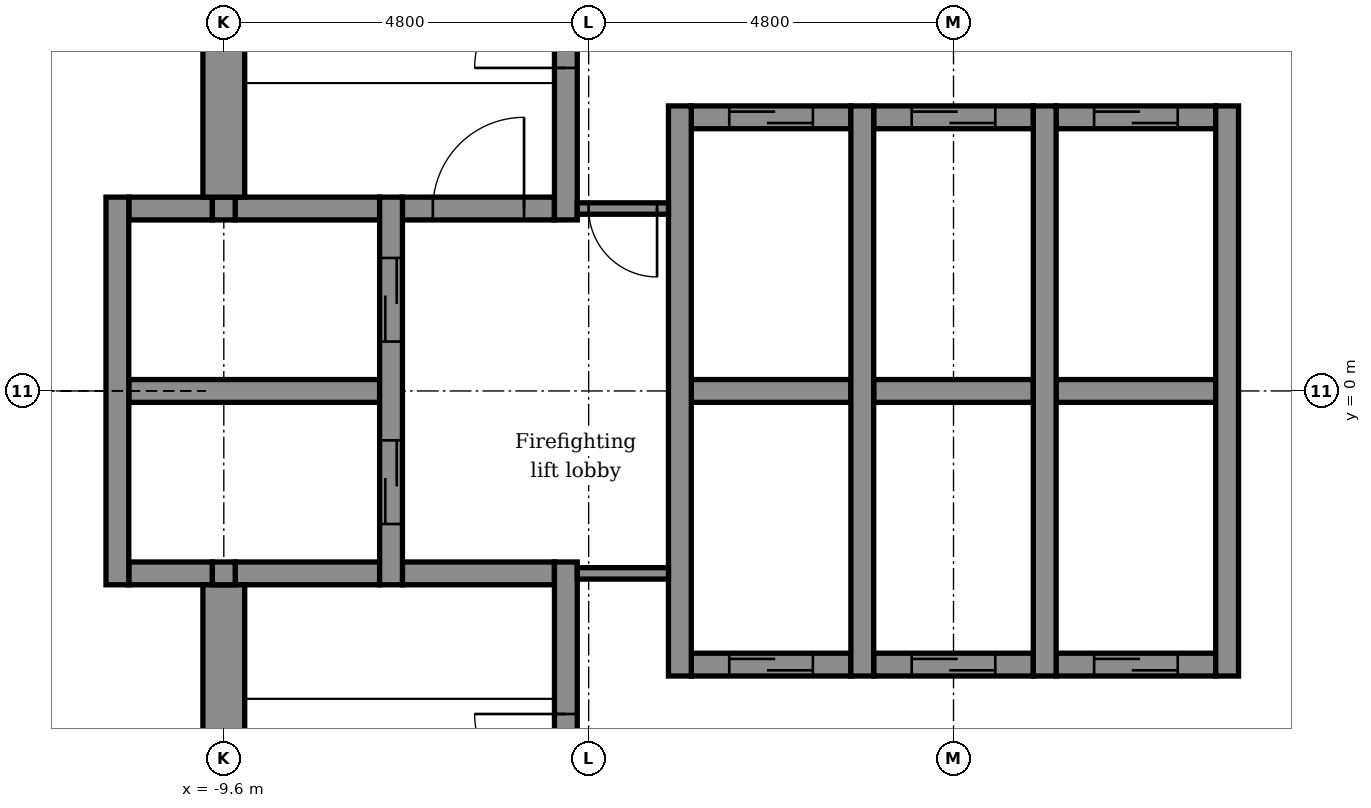
"""IFC4 building model, lengths in metres.
Left out: names, types, materials, properties, quantities, classifications, styles, units other than length and angle.
Written with IfcOpenShell. Run it as: python <this file> out.ifc"""

import sys

from ifc_helpers import new_model, si_unit, direction, frame, frame_2d, origin, place, context, subcontext, project, spatial, rectangle, extrude, element, fill, save


model = new_model("IFC4")
c1 = context("Model", 3, precision=1e-05, world=origin(), true_north=direction((0.0, 1.0)))
c2 = subcontext(c1, "Body", "Model", "MODEL_VIEW")
j1 = project(units=[si_unit("LENGTHUNIT", "METRE"), si_unit("PLANEANGLEUNIT", "RADIAN")], contexts=[c1])
p1 = place(None, origin())
s1 = spatial("IfcSite", under=j1, at=p1, CompositionType="ELEMENT")
p2 = place(p1, origin())
s2 = spatial("IfcBuilding", under=s1, at=p2, CompositionType="ELEMENT")
p3 = place(p2, frame((0.0, 0.0, 257.9)))
s3 = spatial("IfcBuildingStorey", under=s2, at=p3, CompositionType="ELEMENT", Elevation=257.9)
p4 = place(p3, frame((-3.45, -3.6, -0.15), z_axis=(0.0, 0.0, 1.0), x_axis=(1.0, 0.0, 0.0)))
e1 = element("IfcWall", 1, at=p4, inside=s3, PredefinedType="STANDARD", context=c2, shape_type="SweptSolid", body=[
    extrude(rectangle(XDim=2.1, YDim=0.3, at=frame_2d((1.05, 0.0))), origin(), (0.0, 0.0, 1.0), 3.9),
])
p5 = place(p4, frame((0.5, 0.0, 0.15)))
e2 = element("IfcOpeningElement", 2, at=p5, cuts=e1, PredefinedType="OPENING", context=c2, shape_type="SweptSolid", body=[
    extrude(rectangle(XDim=1.1, YDim=2.1, at=frame_2d((0.55, 1.05))), frame((0.0, 0.16, 0.0), z_axis=(0.0, -1.0, 0.0), x_axis=(1.0, 0.0, 0.0)), (0.0, 0.0, 1.0), 0.32),
])
p6 = place(p3, frame((-1.05, -3.6, -0.15), z_axis=(0.0, 0.0, 1.0), x_axis=(1.0, 0.0, 0.0)))
e3 = element("IfcWall", 3, at=p6, inside=s3, PredefinedType="STANDARD", context=c2, shape_type="SweptSolid", body=[
    extrude(rectangle(XDim=2.1, YDim=0.3, at=frame_2d((1.05, 0.0))), origin(), (0.0, 0.0, 1.0), 3.9),
])
p7 = place(p6, frame((0.5, 0.0, 0.15)))
e4 = element("IfcOpeningElement", 4, at=p7, cuts=e3, PredefinedType="OPENING", context=c2, shape_type="SweptSolid", body=[
    extrude(rectangle(XDim=1.1, YDim=2.1, at=frame_2d((0.55, 1.05))), frame((0.0, 0.16, 0.0), z_axis=(0.0, -1.0, 0.0), x_axis=(1.0, 0.0, 0.0)), (0.0, 0.0, 1.0), 0.32),
])
p8 = place(p3, frame((1.35, -3.6, -0.15), z_axis=(0.0, 0.0, 1.0), x_axis=(1.0, 0.0, 0.0)))
e5 = element("IfcWall", 5, at=p8, inside=s3, PredefinedType="STANDARD", context=c2, shape_type="SweptSolid", body=[
    extrude(rectangle(XDim=2.1, YDim=0.3, at=frame_2d((1.05, 0.0))), origin(), (0.0, 0.0, 1.0), 3.9),
])
p9 = place(p8, frame((0.5, 0.0, 0.15)))
e6 = element("IfcOpeningElement", 6, at=p9, cuts=e5, PredefinedType="OPENING", context=c2, shape_type="SweptSolid", body=[
    extrude(rectangle(XDim=1.1, YDim=2.1, at=frame_2d((0.55, 1.05))), frame((0.0, 0.16, 0.0), z_axis=(0.0, -1.0, 0.0), x_axis=(1.0, 0.0, 0.0)), (0.0, 0.0, 1.0), 0.32),
])
p10 = place(p3, frame((-10.85, -2.4, -0.15), z_axis=(0.0, 0.0, 1.0), x_axis=(1.0, 0.0, 0.0)))
e7 = element("IfcWall", 7, at=p10, inside=s3, PredefinedType="STANDARD", context=c2, shape_type="SweptSolid", body=[
    extrude(rectangle(XDim=1.1, YDim=0.3, at=frame_2d((0.55, 0.0))), origin(), (0.0, 0.0, 1.0), 3.9),
])
p11 = place(p3, frame((-9.45, -2.4, -0.15), z_axis=(0.0, 0.0, 1.0), x_axis=(1.0, 0.0, 0.0)))
e8 = element("IfcWall", 8, at=p11, inside=s3, PredefinedType="STANDARD", context=c2, shape_type="SweptSolid", body=[
    extrude(rectangle(XDim=1.9, YDim=0.3, at=frame_2d((0.95, 0.0))), origin(), (0.0, 0.0, 1.0), 3.9),
])
p12 = place(p3, frame((-7.25, -2.4, -0.15), z_axis=(0.0, 0.0, 1.0), x_axis=(1.0, 0.0, 0.0)))
e9 = element("IfcWall", 9, at=p12, inside=s3, PredefinedType="STANDARD", context=c2, shape_type="SweptSolid", body=[
    extrude(rectangle(XDim=2.0, YDim=0.3, at=frame_2d((1.0, 0.0))), origin(), (0.0, 0.0, 1.0), 3.9),
])
p13 = place(p3, frame((-10.85, 0.0, -0.15), z_axis=(0.0, 0.0, 1.0), x_axis=(1.0, 0.0, 0.0)))
e10 = element("IfcWall", 10, at=p13, inside=s3, PredefinedType="STANDARD", context=c2, shape_type="SweptSolid", body=[
    extrude(rectangle(XDim=3.3, YDim=0.3, at=frame_2d((1.65, 0.0))), origin(), (0.0, 0.0, 1.0), 3.9),
])
p14 = place(p3, frame((-3.45, 0.0, -0.15), z_axis=(0.0, 0.0, 1.0), x_axis=(1.0, 0.0, 0.0)))
e11 = element("IfcWall", 11, at=p14, inside=s3, PredefinedType="STANDARD", context=c2, shape_type="SweptSolid", body=[
    extrude(rectangle(XDim=2.1, YDim=0.3, at=frame_2d((1.05, 0.0))), origin(), (0.0, 0.0, 1.0), 3.9),
])
p15 = place(p3, frame((-1.05, 0.0, -0.15), z_axis=(0.0, 0.0, 1.0), x_axis=(1.0, 0.0, 0.0)))
e12 = element("IfcWall", 12, at=p15, inside=s3, PredefinedType="STANDARD", context=c2, shape_type="SweptSolid", body=[
    extrude(rectangle(XDim=2.1, YDim=0.3, at=frame_2d((1.05, 0.0))), origin(), (0.0, 0.0, 1.0), 3.9),
])
p16 = place(p3, frame((1.35, 0.0, -0.15), z_axis=(0.0, 0.0, 1.0), x_axis=(1.0, 0.0, 0.0)))
e13 = element("IfcWall", 13, at=p16, inside=s3, PredefinedType="STANDARD", context=c2, shape_type="SweptSolid", body=[
    extrude(rectangle(XDim=2.1, YDim=0.3, at=frame_2d((1.05, 0.0))), origin(), (0.0, 0.0, 1.0), 3.9),
])
p17 = place(p3, frame((-10.85, 2.4, -0.15), z_axis=(0.0, 0.0, 1.0), x_axis=(1.0, 0.0, 0.0)))
e14 = element("IfcWall", 14, at=p17, inside=s3, PredefinedType="STANDARD", context=c2, shape_type="SweptSolid", body=[
    extrude(rectangle(XDim=1.1, YDim=0.3, at=frame_2d((0.55, 0.0))), origin(), (0.0, 0.0, 1.0), 3.9),
])
p18 = place(p3, frame((-9.45, 2.4, -0.15), z_axis=(0.0, 0.0, 1.0), x_axis=(1.0, 0.0, 0.0)))
e15 = element("IfcWall", 15, at=p18, inside=s3, PredefinedType="STANDARD", context=c2, shape_type="SweptSolid", body=[
    extrude(rectangle(XDim=1.9, YDim=0.3, at=frame_2d((0.95, 0.0))), origin(), (0.0, 0.0, 1.0), 3.9),
])
p19 = place(p3, frame((-7.25, 2.4, -0.15), z_axis=(0.0, 0.0, 1.0), x_axis=(1.0, 0.0, 0.0)))
e16 = element("IfcWall", 16, at=p19, inside=s3, PredefinedType="STANDARD", context=c2, shape_type="SweptSolid", body=[
    extrude(rectangle(XDim=2.0, YDim=0.3, at=frame_2d((1.0, 0.0))), origin(), (0.0, 0.0, 1.0), 3.9),
])
p20 = place(p19, frame((0.4, 0.0, 0.15)))
e17 = element("IfcOpeningElement", 17, at=p20, cuts=e16, PredefinedType="OPENING", context=c2, shape_type="SweptSolid", body=[
    extrude(rectangle(XDim=1.2, YDim=2.1, at=frame_2d((0.6, 1.05))), frame((0.0, 0.16, 0.0), z_axis=(0.0, -1.0, 0.0), x_axis=(1.0, 0.0, 0.0)), (0.0, 0.0, 1.0), 0.32),
])
p21 = place(p3, frame((-3.45, 3.6, -0.15), z_axis=(0.0, 0.0, 1.0), x_axis=(1.0, 0.0, 0.0)))
e18 = element("IfcWall", 18, at=p21, inside=s3, PredefinedType="STANDARD", context=c2, shape_type="SweptSolid", body=[
    extrude(rectangle(XDim=2.1, YDim=0.3, at=frame_2d((1.05, 0.0))), origin(), (0.0, 0.0, 1.0), 3.9),
])
p22 = place(p21, frame((0.5, 0.0, 0.15)))
e19 = element("IfcOpeningElement", 19, at=p22, cuts=e18, PredefinedType="OPENING", context=c2, shape_type="SweptSolid", body=[
    extrude(rectangle(XDim=1.1, YDim=2.1, at=frame_2d((0.55, 1.05))), frame((0.0, 0.16, 0.0), z_axis=(0.0, -1.0, 0.0), x_axis=(1.0, 0.0, 0.0)), (0.0, 0.0, 1.0), 0.32),
])
p23 = place(p3, frame((-1.05, 3.6, -0.15), z_axis=(0.0, 0.0, 1.0), x_axis=(1.0, 0.0, 0.0)))
e20 = element("IfcWall", 20, at=p23, inside=s3, PredefinedType="STANDARD", context=c2, shape_type="SweptSolid", body=[
    extrude(rectangle(XDim=2.1, YDim=0.3, at=frame_2d((1.05, 0.0))), origin(), (0.0, 0.0, 1.0), 3.9),
])
p24 = place(p23, frame((0.5, 0.0, 0.15)))
e21 = element("IfcOpeningElement", 21, at=p24, cuts=e20, PredefinedType="OPENING", context=c2, shape_type="SweptSolid", body=[
    extrude(rectangle(XDim=1.1, YDim=2.1, at=frame_2d((0.55, 1.05))), frame((0.0, 0.16, 0.0), z_axis=(0.0, -1.0, 0.0), x_axis=(1.0, 0.0, 0.0)), (0.0, 0.0, 1.0), 0.32),
])
p25 = place(p3, frame((1.35, 3.6, -0.15), z_axis=(0.0, 0.0, 1.0), x_axis=(1.0, 0.0, 0.0)))
e22 = element("IfcWall", 22, at=p25, inside=s3, PredefinedType="STANDARD", context=c2, shape_type="SweptSolid", body=[
    extrude(rectangle(XDim=2.1, YDim=0.3, at=frame_2d((1.05, 0.0))), origin(), (0.0, 0.0, 1.0), 3.9),
])
p26 = place(p25, frame((0.5, 0.0, 0.15)))
e23 = element("IfcOpeningElement", 23, at=p26, cuts=e22, PredefinedType="OPENING", context=c2, shape_type="SweptSolid", body=[
    extrude(rectangle(XDim=1.1, YDim=2.1, at=frame_2d((0.55, 1.05))), frame((0.0, 0.16, 0.0), z_axis=(0.0, -1.0, 0.0), x_axis=(1.0, 0.0, 0.0)), (0.0, 0.0, 1.0), 0.32),
])
p27 = place(p3, frame((-11.0, -2.55, -0.15), z_axis=(0.0, 0.0, 1.0), x_axis=(0.0, 1.0, 0.0)))
e24 = element("IfcWall", 24, at=p27, inside=s3, PredefinedType="STANDARD", context=c2, shape_type="SweptSolid", body=[
    extrude(rectangle(XDim=5.1, YDim=0.3, at=frame_2d((2.55, 0.0))), origin(), (0.0, 0.0, 1.0), 3.9),
])
p28 = place(p3, frame((-9.6, -10.15, -0.15), z_axis=(0.0, 0.0, 1.0), x_axis=(0.0, 1.0, 0.0)))
e25 = element("IfcWall", 25, at=p28, inside=s3, PredefinedType="SHEAR", context=c2, shape_type="SweptSolid", body=[
    extrude(rectangle(XDim=7.6, YDim=0.55, at=frame_2d((3.8, 0.0))), origin(), (0.0, 0.0, 1.0), 3.9),
])
for number, where, z_axis, x_axis in (
    (26, (-9.6, -2.55, -0.15), (0.0, 0.0, 1.0), (0.0, 1.0, 0.0)),
    (27, (-9.6, 2.25, -0.15), (0.0, 0.0, 1.0), (0.0, 1.0, 0.0)),
):
    element("IfcWall", number, at=place(p3, frame(where, z_axis=z_axis, x_axis=x_axis)), inside=s3, PredefinedType="STANDARD", context=c2, shape_type="SweptSolid", body=[
        extrude(rectangle(XDim=0.3, YDim=0.3, at=frame_2d((0.15, 0.0))), origin(), (0.0, 0.0, 1.0), 3.9),
    ])
p29 = place(p3, frame((-9.6, 2.55, -0.15), z_axis=(0.0, 0.0, 1.0), x_axis=(0.0, 1.0, 0.0)))
e28 = element("IfcWall", 28, at=p29, inside=s3, PredefinedType="SHEAR", context=c2, shape_type="SweptSolid", body=[
    extrude(rectangle(XDim=7.6, YDim=0.55, at=frame_2d((3.8, 0.0))), origin(), (0.0, 0.0, 1.0), 3.9),
])
p30 = place(p3, frame((-7.4, -2.55, -0.15), z_axis=(0.0, 0.0, 1.0), x_axis=(0.0, 1.0, 0.0)))
e29 = element("IfcWall", 29, at=p30, inside=s3, PredefinedType="STANDARD", context=c2, shape_type="SweptSolid", body=[
    extrude(rectangle(XDim=5.1, YDim=0.3, at=frame_2d((2.55, 0.0))), origin(), (0.0, 0.0, 1.0), 3.9),
])
p31 = place(p30, frame((0.8, 0.0, 0.15)))
e30 = element("IfcOpeningElement", 30, at=p31, cuts=e29, PredefinedType="OPENING", context=c2, shape_type="SweptSolid", body=[
    extrude(rectangle(XDim=1.1, YDim=2.1, at=frame_2d((0.55, 1.05))), frame((0.0, 0.16, 0.0), z_axis=(0.0, -1.0, 0.0), x_axis=(1.0, 0.0, 0.0)), (0.0, 0.0, 1.0), 0.32),
])
p32 = place(p30, frame((3.2, 0.0, 0.15)))
e31 = element("IfcOpeningElement", 31, at=p32, cuts=e29, PredefinedType="OPENING", context=c2, shape_type="SweptSolid", body=[
    extrude(rectangle(XDim=1.1, YDim=2.1, at=frame_2d((0.55, 1.05))), frame((0.0, 0.16, 0.0), z_axis=(0.0, -1.0, 0.0), x_axis=(1.0, 0.0, 0.0)), (0.0, 0.0, 1.0), 0.32),
])
p33 = place(p3, frame((-5.1, -9.325, -0.15), z_axis=(0.0, 0.0, 1.0), x_axis=(0.0, 1.0, 0.0)))
e32 = element("IfcWall", 32, at=p33, inside=s3, PredefinedType="STANDARD", context=c2, shape_type="SweptSolid", body=[
    extrude(rectangle(XDim=7.075, YDim=0.3, at=frame_2d((3.538, 0.0))), origin(), (0.0, 0.0, 1.0), 3.9),
])
p34 = place(p33, frame((3.875, 0.0, 0.15)))
e33 = element("IfcOpeningElement", 33, at=p34, cuts=e32, PredefinedType="OPENING", context=c2, shape_type="SweptSolid", body=[
    extrude(rectangle(XDim=1.2, YDim=2.1, at=frame_2d((0.6, 1.05))), frame((0.0, 0.16, 0.0), z_axis=(0.0, -1.0, 0.0), x_axis=(1.0, 0.0, 0.0)), (0.0, 0.0, 1.0), 0.32),
])
p35 = place(p3, frame((-5.1, 2.25, -0.15), z_axis=(0.0, 0.0, 1.0), x_axis=(0.0, 1.0, 0.0)))
e34 = element("IfcWall", 34, at=p35, inside=s3, PredefinedType="STANDARD", context=c2, shape_type="SweptSolid", body=[
    extrude(rectangle(XDim=7.075, YDim=0.3, at=frame_2d((3.538, 0.0))), origin(), (0.0, 0.0, 1.0), 3.9),
])
p36 = place(p35, frame((2.0, 0.0, 0.15)))
e35 = element("IfcOpeningElement", 35, at=p36, cuts=e34, PredefinedType="OPENING", context=c2, shape_type="SweptSolid", body=[
    extrude(rectangle(XDim=1.2, YDim=2.1, at=frame_2d((0.6, 1.05))), frame((0.0, 0.16, 0.0), z_axis=(0.0, -1.0, 0.0), x_axis=(1.0, 0.0, 0.0)), (0.0, 0.0, 1.0), 0.32),
])
for number, where, z_axis, x_axis in (
    (36, (-3.6, -3.75, -0.15), (0.0, 0.0, 1.0), (0.0, 1.0, 0.0)),
    (37, (-1.2, -3.75, -0.15), (0.0, 0.0, 1.0), (0.0, 1.0, 0.0)),
    (38, (1.2, -3.75, -0.15), (0.0, 0.0, 1.0), (0.0, 1.0, 0.0)),
    (39, (3.6, -3.75, -0.15), (0.0, 0.0, 1.0), (0.0, 1.0, 0.0)),
):
    element("IfcWall", number, at=place(p3, frame(where, z_axis=z_axis, x_axis=x_axis)), inside=s3, PredefinedType="STANDARD", context=c2, shape_type="SweptSolid", body=[
        extrude(rectangle(XDim=7.5, YDim=0.3, at=frame_2d((3.75, 0.0))), origin(), (0.0, 0.0, 1.0), 3.9),
    ])
p37 = place(p3, frame((-4.95, 2.4, 0.0), z_axis=(0.0, 0.0, 1.0), x_axis=(1.0, 0.0, 0.0)))
e40 = element("IfcWall", 40, at=p37, inside=s3, PredefinedType="PARTITIONING", context=c2, shape_type="SweptSolid", body=[
    extrude(rectangle(XDim=1.2, YDim=0.15, at=frame_2d((0.6, 0.0))), origin(), (0.0, 0.0, 1.0), 3.75),
])
p38 = place(p37, frame((0.15, 0.0, 0.0)))
e41 = element("IfcOpeningElement", 41, at=p38, cuts=e40, PredefinedType="OPENING", context=c2, shape_type="SweptSolid", body=[
    extrude(rectangle(XDim=0.9, YDim=2.1, at=frame_2d((0.45, 1.05))), frame((0.0, 0.085, 0.0), z_axis=(0.0, -1.0, 0.0), x_axis=(1.0, 0.0, 0.0)), (0.0, 0.0, 1.0), 0.17),
])
p39 = place(p3, frame((-4.95, -2.4, 0.0), z_axis=(0.0, 0.0, 1.0), x_axis=(1.0, 0.0, 0.0)))
e42 = element("IfcWall", 42, at=p39, inside=s3, PredefinedType="PARTITIONING", context=c2, shape_type="SweptSolid", body=[
    extrude(rectangle(XDim=1.2, YDim=0.15, at=frame_2d((0.6, 0.0))), origin(), (0.0, 0.0, 1.0), 3.75),
])
p40 = place(p31, origin())
e43 = element("IfcDoor", 43, at=p40, inside=s3, OperationType="DOUBLE_DOOR_SLIDING", PredefinedType="DOOR", context=c2, shape_type="SweptSolid", body=[
    extrude(rectangle(XDim=1.1, YDim=2.1, at=frame_2d((0.55, 1.05))), frame((0.0, 0.025, 0.0), z_axis=(0.0, -1.0, 0.0), x_axis=(1.0, 0.0, 0.0)), (0.0, 0.0, 1.0), 0.05),
])
fill(e30, e43)
p41 = place(p32, origin())
e44 = element("IfcDoor", 44, at=p41, inside=s3, OperationType="DOUBLE_DOOR_SLIDING", PredefinedType="DOOR", context=c2, shape_type="SweptSolid", body=[
    extrude(rectangle(XDim=1.1, YDim=2.1, at=frame_2d((0.55, 1.05))), frame((0.0, 0.025, 0.0), z_axis=(0.0, -1.0, 0.0), x_axis=(1.0, 0.0, 0.0)), (0.0, 0.0, 1.0), 0.05),
])
fill(e31, e44)
p42 = place(p22, origin())
e45 = element("IfcDoor", 45, at=p42, inside=s3, OperationType="DOUBLE_DOOR_SLIDING", PredefinedType="DOOR", context=c2, shape_type="SweptSolid", body=[
    extrude(rectangle(XDim=1.1, YDim=2.1, at=frame_2d((0.55, 1.05))), frame((0.0, 0.025, 0.0), z_axis=(0.0, -1.0, 0.0), x_axis=(1.0, 0.0, 0.0)), (0.0, 0.0, 1.0), 0.05),
])
fill(e19, e45)
p43 = place(p24, origin())
e46 = element("IfcDoor", 46, at=p43, inside=s3, OperationType="DOUBLE_DOOR_SLIDING", PredefinedType="DOOR", context=c2, shape_type="SweptSolid", body=[
    extrude(rectangle(XDim=1.1, YDim=2.1, at=frame_2d((0.55, 1.05))), frame((0.0, 0.025, 0.0), z_axis=(0.0, -1.0, 0.0), x_axis=(1.0, 0.0, 0.0)), (0.0, 0.0, 1.0), 0.05),
])
fill(e21, e46)
p44 = place(p26, origin())
e47 = element("IfcDoor", 47, at=p44, inside=s3, OperationType="DOUBLE_DOOR_SLIDING", PredefinedType="DOOR", context=c2, shape_type="SweptSolid", body=[
    extrude(rectangle(XDim=1.1, YDim=2.1, at=frame_2d((0.55, 1.05))), frame((0.0, 0.025, 0.0), z_axis=(0.0, -1.0, 0.0), x_axis=(1.0, 0.0, 0.0)), (0.0, 0.0, 1.0), 0.05),
])
fill(e23, e47)
p45 = place(p5, origin())
e48 = element("IfcDoor", 48, at=p45, inside=s3, OperationType="DOUBLE_DOOR_SLIDING", PredefinedType="DOOR", context=c2, shape_type="SweptSolid", body=[
    extrude(rectangle(XDim=1.1, YDim=2.1, at=frame_2d((0.55, 1.05))), frame((0.0, 0.025, 0.0), z_axis=(0.0, -1.0, 0.0), x_axis=(1.0, 0.0, 0.0)), (0.0, 0.0, 1.0), 0.05),
])
fill(e2, e48)
p46 = place(p7, origin())
e49 = element("IfcDoor", 49, at=p46, inside=s3, OperationType="DOUBLE_DOOR_SLIDING", PredefinedType="DOOR", context=c2, shape_type="SweptSolid", body=[
    extrude(rectangle(XDim=1.1, YDim=2.1, at=frame_2d((0.55, 1.05))), frame((0.0, 0.025, 0.0), z_axis=(0.0, -1.0, 0.0), x_axis=(1.0, 0.0, 0.0)), (0.0, 0.0, 1.0), 0.05),
])
fill(e4, e49)
p47 = place(p9, origin())
e50 = element("IfcDoor", 50, at=p47, inside=s3, OperationType="DOUBLE_DOOR_SLIDING", PredefinedType="DOOR", context=c2, shape_type="SweptSolid", body=[
    extrude(rectangle(XDim=1.1, YDim=2.1, at=frame_2d((0.55, 1.05))), frame((0.0, 0.025, 0.0), z_axis=(0.0, -1.0, 0.0), x_axis=(1.0, 0.0, 0.0)), (0.0, 0.0, 1.0), 0.05),
])
fill(e6, e50)
p48 = place(p36, origin())
e51 = element("IfcDoor", 51, at=p48, inside=s3, OperationType="SINGLE_SWING_LEFT", PredefinedType="DOOR", context=c2, shape_type="SweptSolid", body=[
    extrude(rectangle(XDim=1.2, YDim=2.1, at=frame_2d((0.6, 1.05))), frame((0.0, 0.025, 0.0), z_axis=(0.0, -1.0, 0.0), x_axis=(1.0, 0.0, 0.0)), (0.0, 0.0, 1.0), 0.05),
])
fill(e35, e51)
p49 = place(p34, origin())
e52 = element("IfcDoor", 52, at=p49, inside=s3, OperationType="SINGLE_SWING_RIGHT", PredefinedType="DOOR", context=c2, shape_type="SweptSolid", body=[
    extrude(rectangle(XDim=1.2, YDim=2.1, at=frame_2d((0.6, 1.05))), frame((0.0, 0.025, 0.0), z_axis=(0.0, -1.0, 0.0), x_axis=(1.0, 0.0, 0.0)), (0.0, 0.0, 1.0), 0.05),
])
fill(e33, e52)
p50 = place(p38, frame((0.9, 0.0, 0.0), z_axis=(0.0, 0.0, 1.0), x_axis=(-1.0, 0.0, 0.0)))
e53 = element("IfcDoor", 53, at=p50, inside=s3, OperationType="SINGLE_SWING_RIGHT", PredefinedType="DOOR", context=c2, shape_type="SweptSolid", body=[
    extrude(rectangle(XDim=0.9, YDim=2.1, at=frame_2d((0.45, 1.05))), frame((0.0, 0.025, 0.0), z_axis=(0.0, -1.0, 0.0), x_axis=(1.0, 0.0, 0.0)), (0.0, 0.0, 1.0), 0.05),
])
fill(e41, e53)
p51 = place(p20, origin())
e54 = element("IfcDoor", 54, at=p51, inside=s3, OperationType="SINGLE_SWING_RIGHT", PredefinedType="DOOR", context=c2, shape_type="SweptSolid", body=[
    extrude(rectangle(XDim=1.2, YDim=2.1, at=frame_2d((0.6, 1.05))), frame((0.0, 0.025, 0.0), z_axis=(0.0, -1.0, 0.0), x_axis=(1.0, 0.0, 0.0)), (0.0, 0.0, 1.0), 0.05),
])
fill(e17, e54)
save(model, sys.argv[1])
